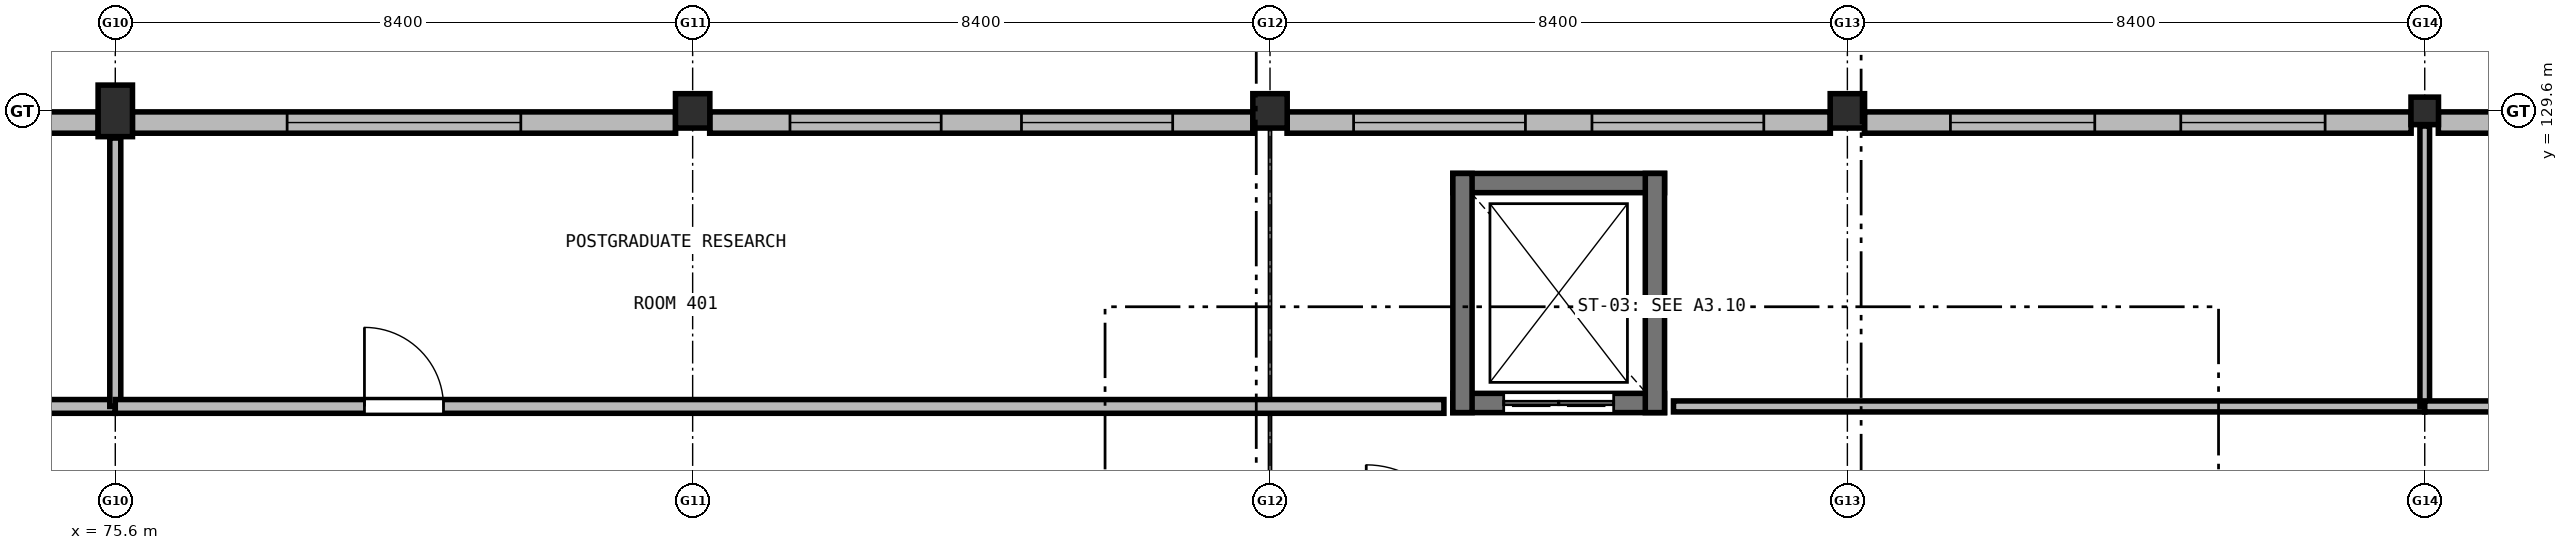
"""IFC4 building model, lengths in metres.
Left out: names, types, materials, properties, quantities, classifications, styles, units other than length and angle.
Written with IfcOpenShell. Run it as: python <this file> out.ifc"""

import sys

from ifc_helpers import new_model, si_unit, direction, frame, frame_2d, origin, origin_2d, place, context, subcontext, project, spatial, rectangle, extrude, element, fill, save


model = new_model("IFC4")
c1 = context("Model", 3, precision=1e-05, world=origin(), true_north=direction((0.0, 1.0)))
c2 = subcontext(c1, "Body", "Model", "MODEL_VIEW")
j1 = project(units=[si_unit("LENGTHUNIT", "METRE"), si_unit("PLANEANGLEUNIT", "RADIAN")], contexts=[c1])
p1 = place(None, origin())
s1 = spatial("IfcSite", under=j1, at=p1, CompositionType="ELEMENT")
p2 = place(p1, origin())
s2 = spatial("IfcBuilding", under=s1, at=p2, CompositionType="ELEMENT")
p3 = place(p2, frame((0.0, 0.0, 17.7)))
s3 = spatial("IfcBuildingStorey", under=s2, at=p3, CompositionType="ELEMENT", Elevation=17.7)
p4 = place(p3, frame((75.6, 129.6, 0.0), z_axis=(0.0, 0.0, 1.0), x_axis=(1.0, 0.0, 0.0)))
e1 = element("IfcColumn", 1, at=p4, inside=s3, PredefinedType="COLUMN", context=c2, shape_type="SweptSolid", body=[
    extrude(rectangle(XDim=0.5, YDim=0.75, at=origin_2d()), origin(), (0.0, 0.0, 1.0), 4.2),
])
for number, where, z_axis, x_axis in (
    (2, (84.0, 129.6, 0.0), (0.0, 0.0, 1.0), (1.0, 0.0, 0.0)),
    (3, (92.4, 129.6, 0.0), (0.0, 0.0, 1.0), (1.0, 0.0, 0.0)),
    (4, (100.8, 129.6, 0.0), (0.0, 0.0, 1.0), (1.0, 0.0, 0.0)),
):
    element("IfcColumn", number, at=place(p3, frame(where, z_axis=z_axis, x_axis=x_axis)), inside=s3, PredefinedType="COLUMN", context=c2, shape_type="SweptSolid", body=[
        extrude(rectangle(XDim=0.5, YDim=0.5, at=origin_2d()), origin(), (0.0, 0.0, 1.0), 4.2),
    ])
p5 = place(p3, frame((109.2, 129.6, 0.0), z_axis=(0.0, 0.0, 1.0), x_axis=(1.0, 0.0, 0.0)))
e5 = element("IfcColumn", 5, at=p5, inside=s3, PredefinedType="COLUMN", context=c2, shape_type="SweptSolid", body=[
    extrude(rectangle(XDim=0.4, YDim=0.4, at=origin_2d()), origin(), (0.0, 0.0, 1.0), 4.2),
])
p6 = place(p3, frame((67.448, 129.43, 0.0), z_axis=(0.0, 0.0, 1.0), x_axis=(1.0, 0.0, 0.0)))
e6 = element("IfcWall", 6, at=p6, inside=s3, PredefinedType="SOLIDWALL", context=c2, shape_type="SweptSolid", body=[
    extrude(rectangle(XDim=7.904, YDim=0.31, at=frame_2d((3.952, 0.0))), origin(), (0.0, 0.0, 1.0), 3.25),
])
p7 = place(p6, frame((2.152, 0.0, 0.95)))
e7 = element("IfcOpeningElement", 7, at=p7, cuts=e6, PredefinedType="OPENING", context=c2, shape_type="SweptSolid", body=[
    extrude(rectangle(XDim=3.6, YDim=2.05, at=frame_2d((1.8, 1.025))), frame((0.0, 0.165, 0.0), z_axis=(0.0, -1.0, 0.0), x_axis=(1.0, 0.0, 0.0)), (0.0, 0.0, 1.0), 0.33),
])
p8 = place(p3, frame((75.848, 129.43, 0.0), z_axis=(0.0, 0.0, 1.0), x_axis=(1.0, 0.0, 0.0)))
e8 = element("IfcWall", 8, at=p8, inside=s3, PredefinedType="SOLIDWALL", context=c2, shape_type="SweptSolid", body=[
    extrude(rectangle(XDim=7.904, YDim=0.31, at=frame_2d((3.952, 0.0))), origin(), (0.0, 0.0, 1.0), 3.25),
])
p9 = place(p8, frame((2.252, 0.0, 0.95)))
e9 = element("IfcOpeningElement", 9, at=p9, cuts=e8, PredefinedType="OPENING", context=c2, shape_type="SweptSolid", body=[
    extrude(rectangle(XDim=3.4, YDim=1.8, at=frame_2d((1.7, 0.9))), frame((0.0, 0.165, 0.0), z_axis=(0.0, -1.0, 0.0), x_axis=(1.0, 0.0, 0.0)), (0.0, 0.0, 1.0), 0.33),
])
p10 = place(p3, frame((84.248, 129.43, 0.0), z_axis=(0.0, 0.0, 1.0), x_axis=(1.0, 0.0, 0.0)))
e10 = element("IfcWall", 10, at=p10, inside=s3, PredefinedType="SOLIDWALL", context=c2, shape_type="SweptSolid", body=[
    extrude(rectangle(XDim=7.904, YDim=0.31, at=frame_2d((3.952, 0.0))), origin(), (0.0, 0.0, 1.0), 3.25),
])
p11 = place(p10, frame((1.168, 0.0, 0.95)))
e11 = element("IfcOpeningElement", 11, at=p11, cuts=e10, PredefinedType="OPENING", context=c2, shape_type="SweptSolid", body=[
    extrude(rectangle(XDim=2.2, YDim=1.7, at=frame_2d((1.1, 0.85))), frame((0.0, 0.165, 0.0), z_axis=(0.0, -1.0, 0.0), x_axis=(1.0, 0.0, 0.0)), (0.0, 0.0, 1.0), 0.33),
])
p12 = place(p10, frame((4.536, 0.0, 0.95)))
e12 = element("IfcOpeningElement", 12, at=p12, cuts=e10, PredefinedType="OPENING", context=c2, shape_type="SweptSolid", body=[
    extrude(rectangle(XDim=2.2, YDim=1.7, at=frame_2d((1.1, 0.85))), frame((0.0, 0.165, 0.0), z_axis=(0.0, -1.0, 0.0), x_axis=(1.0, 0.0, 0.0)), (0.0, 0.0, 1.0), 0.33),
])
p13 = place(p3, frame((92.648, 129.43, 0.0), z_axis=(0.0, 0.0, 1.0), x_axis=(1.0, 0.0, 0.0)))
e13 = element("IfcWall", 13, at=p13, inside=s3, PredefinedType="SOLIDWALL", context=c2, shape_type="SweptSolid", body=[
    extrude(rectangle(XDim=7.904, YDim=0.31, at=frame_2d((3.952, 0.0))), origin(), (0.0, 0.0, 1.0), 3.25),
])
p14 = place(p13, frame((0.968, 0.0, 0.95)))
e14 = element("IfcOpeningElement", 14, at=p14, cuts=e13, PredefinedType="OPENING", context=c2, shape_type="SweptSolid", body=[
    extrude(rectangle(XDim=2.5, YDim=2.05, at=frame_2d((1.25, 1.025))), frame((0.0, 0.165, 0.0), z_axis=(0.0, -1.0, 0.0), x_axis=(1.0, 0.0, 0.0)), (0.0, 0.0, 1.0), 0.33),
])
p15 = place(p13, frame((4.436, 0.0, 0.95)))
e15 = element("IfcOpeningElement", 15, at=p15, cuts=e13, PredefinedType="OPENING", context=c2, shape_type="SweptSolid", body=[
    extrude(rectangle(XDim=2.5, YDim=2.05, at=frame_2d((1.25, 1.025))), frame((0.0, 0.165, 0.0), z_axis=(0.0, -1.0, 0.0), x_axis=(1.0, 0.0, 0.0)), (0.0, 0.0, 1.0), 0.33),
])
p16 = place(p3, frame((101.048, 129.43, 0.0), z_axis=(0.0, 0.0, 1.0), x_axis=(1.0, 0.0, 0.0)))
e16 = element("IfcWall", 16, at=p16, inside=s3, PredefinedType="SOLIDWALL", context=c2, shape_type="SweptSolid", body=[
    extrude(rectangle(XDim=7.954, YDim=0.31, at=frame_2d((3.977, 0.0))), origin(), (0.0, 0.0, 1.0), 3.25),
])
p17 = place(p16, frame((1.251, 0.0, 0.95)))
e17 = element("IfcOpeningElement", 17, at=p17, cuts=e16, PredefinedType="OPENING", context=c2, shape_type="SweptSolid", body=[
    extrude(rectangle(XDim=2.1, YDim=1.85, at=frame_2d((1.05, 0.925))), frame((0.0, 0.165, 0.0), z_axis=(0.0, -1.0, 0.0), x_axis=(1.0, 0.0, 0.0)), (0.0, 0.0, 1.0), 0.33),
])
p18 = place(p16, frame((4.603, 0.0, 0.95)))
e18 = element("IfcOpeningElement", 18, at=p18, cuts=e16, PredefinedType="OPENING", context=c2, shape_type="SweptSolid", body=[
    extrude(rectangle(XDim=2.1, YDim=1.85, at=frame_2d((1.05, 0.925))), frame((0.0, 0.165, 0.0), z_axis=(0.0, -1.0, 0.0), x_axis=(1.0, 0.0, 0.0)), (0.0, 0.0, 1.0), 0.33),
])
p19 = place(p3, frame((109.398, 129.43, 0.0), z_axis=(0.0, 0.0, 1.0), x_axis=(1.0, 0.0, 0.0)))
e19 = element("IfcWall", 19, at=p19, inside=s3, PredefinedType="SOLIDWALL", context=c2, shape_type="SweptSolid", body=[
    extrude(rectangle(XDim=8.004, YDim=0.31, at=frame_2d((4.002, 0.0))), origin(), (0.0, 0.0, 1.0), 3.25),
])
p20 = place(p19, frame((1.535, 0.0, 0.95)))
e20 = element("IfcOpeningElement", 20, at=p20, cuts=e19, PredefinedType="OPENING", context=c2, shape_type="SweptSolid", body=[
    extrude(rectangle(XDim=1.7, YDim=1.65, at=frame_2d((0.85, 0.825))), frame((0.0, 0.165, 0.0), z_axis=(0.0, -1.0, 0.0), x_axis=(1.0, 0.0, 0.0)), (0.0, 0.0, 1.0), 0.33),
])
p21 = place(p19, frame((4.769, 0.0, 0.95)))
e21 = element("IfcOpeningElement", 21, at=p21, cuts=e19, PredefinedType="OPENING", context=c2, shape_type="SweptSolid", body=[
    extrude(rectangle(XDim=1.7, YDim=1.65, at=frame_2d((0.85, 0.825))), frame((0.0, 0.165, 0.0), z_axis=(0.0, -1.0, 0.0), x_axis=(1.0, 0.0, 0.0)), (0.0, 0.0, 1.0), 0.33),
])
p22 = place(p3, frame((98.14, 125.35, 0.0), z_axis=(0.0, 0.0, 1.0), x_axis=(-1.0, 0.0, 0.0)))
e22 = element("IfcWall", 22, at=p22, inside=s3, PredefinedType="SHEAR", context=c2, shape_type="SweptSolid", body=[
    extrude(rectangle(XDim=3.08, YDim=0.28, at=frame_2d((1.54, 0.0))), origin(), (0.0, 0.0, 1.0), 3.88),
])
p23 = place(p22, frame((0.74, 0.0, 0.0)))
e23 = element("IfcOpeningElement", 23, at=p23, cuts=e22, PredefinedType="OPENING", context=c2, shape_type="SweptSolid", body=[
    extrude(rectangle(XDim=1.6, YDim=2.2, at=frame_2d((0.8, 1.1))), frame((0.0, 0.15, 0.0), z_axis=(0.0, -1.0, 0.0), x_axis=(1.0, 0.0, 0.0)), (0.0, 0.0, 1.0), 0.3),
])
p24 = place(p3, frame((95.06, 128.55, 0.0), z_axis=(0.0, 0.0, 1.0), x_axis=(1.0, 0.0, 0.0)))
e24 = element("IfcWall", 24, at=p24, inside=s3, PredefinedType="SHEAR", context=c2, shape_type="SweptSolid", body=[
    extrude(rectangle(XDim=3.08, YDim=0.28, at=frame_2d((1.54, 0.0))), origin(), (0.0, 0.0, 1.0), 3.88),
])
for number, where, z_axis, x_axis in (
    (25, (95.2, 125.21, 0.0), (0.0, 0.0, 1.0), (0.0, 1.0, 0.0)),
    (26, (98.0, 128.69, 0.0), (0.0, 0.0, 1.0), (0.0, -1.0, 0.0)),
):
    element("IfcWall", number, at=place(p3, frame(where, z_axis=z_axis, x_axis=x_axis)), inside=s3, PredefinedType="SHEAR", context=c2, shape_type="SweptSolid", body=[
        extrude(rectangle(XDim=3.48, YDim=0.28, at=frame_2d((1.74, 0.0))), origin(), (0.0, 0.0, 1.0), 3.88),
    ])
p25 = place(p3, frame((56.07, 125.3, 0.0), z_axis=(0.0, 0.0, 1.0), x_axis=(1.0, 0.0, 0.0)))
e27 = element("IfcWall", 27, at=p25, inside=s3, PredefinedType="SOLIDWALL", context=c2, shape_type="SweptSolid", body=[
    extrude(rectangle(XDim=19.53, YDim=0.2, at=frame_2d((9.765, 0.0))), origin(), (0.0, 0.0, 1.0), 3.355),
])
p26 = place(p3, frame((75.6, 125.3, 0.0), z_axis=(0.0, 0.0, 1.0), x_axis=(0.0, 1.0, 0.0)))
e28 = element("IfcWall", 28, at=p26, inside=s3, PredefinedType="PARTITIONING", context=c2, shape_type="SweptSolid", body=[
    extrude(rectangle(XDim=3.905, YDim=0.16, at=frame_2d((1.953, 0.0))), origin(), (0.0, 0.0, 1.0), 3.245),
])
p27 = place(p3, frame((75.6, 125.3, 0.0), z_axis=(0.0, 0.0, 1.0), x_axis=(1.0, 0.0, 0.0)))
e29 = element("IfcWall", 29, at=p27, inside=s3, PredefinedType="SOLIDWALL", context=c2, shape_type="SweptSolid", body=[
    extrude(rectangle(XDim=19.33, YDim=0.2, at=frame_2d((9.665, 0.0))), origin(), (0.0, 0.0, 1.0), 3.355),
])
p28 = place(p27, frame((3.625, 0.0, 0.0)))
e30 = element("IfcOpeningElement", 30, at=p28, cuts=e29, PredefinedType="OPENING", context=c2, shape_type="SweptSolid", body=[
    extrude(rectangle(XDim=1.15, YDim=2.15, at=frame_2d((0.575, 1.075))), frame((0.0, 0.11, 0.0), z_axis=(0.0, -1.0, 0.0), x_axis=(1.0, 0.0, 0.0)), (0.0, 0.0, 1.0), 0.22),
])
p29 = place(p3, frame((98.27, 125.3, 0.0), z_axis=(0.0, 0.0, 1.0), x_axis=(1.0, 0.0, 0.0)))
e31 = element("IfcWall", 31, at=p29, inside=s3, PredefinedType="PARTITIONING", context=c2, shape_type="SweptSolid", body=[
    extrude(rectangle(XDim=10.93, YDim=0.16, at=frame_2d((5.465, 0.0))), origin(), (0.0, 0.0, 1.0), 3.355),
])
p30 = place(p3, frame((109.2, 125.3, 0.0), z_axis=(0.0, 0.0, 1.0), x_axis=(0.0, 1.0, 0.0)))
e32 = element("IfcWall", 32, at=p30, inside=s3, PredefinedType="PARTITIONING", context=c2, shape_type="SweptSolid", body=[
    extrude(rectangle(XDim=4.08, YDim=0.14, at=frame_2d((2.04, 0.0))), origin(), (0.0, 0.0, 1.0), 3.245),
])
p31 = place(p3, frame((109.2, 125.3, 0.0), z_axis=(0.0, 0.0, 1.0), x_axis=(1.0, 0.0, 0.0)))
e33 = element("IfcWall", 33, at=p31, inside=s3, PredefinedType="PARTITIONING", context=c2, shape_type="SweptSolid", body=[
    extrude(rectangle(XDim=24.98, YDim=0.16, at=frame_2d((12.49, 0.0))), origin(), (0.0, 0.0, 1.0), 3.355),
])
p32 = place(p31, frame((3.375, 0.0, 0.0)))
e34 = element("IfcOpeningElement", 34, at=p32, cuts=e33, PredefinedType="OPENING", context=c2, shape_type="SweptSolid", body=[
    extrude(rectangle(XDim=1.65, YDim=2.2, at=frame_2d((0.825, 1.1))), frame((0.0, 0.09, 0.0), z_axis=(0.0, -1.0, 0.0), x_axis=(1.0, 0.0, 0.0)), (0.0, 0.0, 1.0), 0.18),
])
p33 = place(p9, origin())
e35 = element("IfcWindow", 35, at=p33, inside=s3, PartitioningType="SINGLE_PANEL", PredefinedType="WINDOW", context=c2, shape_type="SweptSolid", body=[
    extrude(rectangle(XDim=3.4, YDim=1.8, at=frame_2d((1.7, 0.9))), frame((0.0, 0.03, 0.0), z_axis=(0.0, -1.0, 0.0), x_axis=(1.0, 0.0, 0.0)), (0.0, 0.0, 1.0), 0.06),
])
fill(e9, e35)
p34 = place(p11, origin())
e36 = element("IfcWindow", 36, at=p34, inside=s3, PartitioningType="SINGLE_PANEL", PredefinedType="WINDOW", context=c2, shape_type="SweptSolid", body=[
    extrude(rectangle(XDim=2.2, YDim=1.7, at=frame_2d((1.1, 0.85))), frame((0.0, 0.03, 0.0), z_axis=(0.0, -1.0, 0.0), x_axis=(1.0, 0.0, 0.0)), (0.0, 0.0, 1.0), 0.06),
])
fill(e11, e36)
p35 = place(p12, origin())
e37 = element("IfcWindow", 37, at=p35, inside=s3, PartitioningType="SINGLE_PANEL", PredefinedType="WINDOW", context=c2, shape_type="SweptSolid", body=[
    extrude(rectangle(XDim=2.2, YDim=1.7, at=frame_2d((1.1, 0.85))), frame((0.0, 0.03, 0.0), z_axis=(0.0, -1.0, 0.0), x_axis=(1.0, 0.0, 0.0)), (0.0, 0.0, 1.0), 0.06),
])
fill(e12, e37)
p36 = place(p14, origin())
e38 = element("IfcWindow", 38, at=p36, inside=s3, PartitioningType="SINGLE_PANEL", PredefinedType="WINDOW", context=c2, shape_type="SweptSolid", body=[
    extrude(rectangle(XDim=2.5, YDim=2.05, at=frame_2d((1.25, 1.025))), frame((0.0, 0.03, 0.0), z_axis=(0.0, -1.0, 0.0), x_axis=(1.0, 0.0, 0.0)), (0.0, 0.0, 1.0), 0.06),
])
fill(e14, e38)
p37 = place(p15, origin())
e39 = element("IfcWindow", 39, at=p37, inside=s3, PartitioningType="SINGLE_PANEL", PredefinedType="WINDOW", context=c2, shape_type="SweptSolid", body=[
    extrude(rectangle(XDim=2.5, YDim=2.05, at=frame_2d((1.25, 1.025))), frame((0.0, 0.03, 0.0), z_axis=(0.0, -1.0, 0.0), x_axis=(1.0, 0.0, 0.0)), (0.0, 0.0, 1.0), 0.06),
])
fill(e15, e39)
p38 = place(p17, origin())
e40 = element("IfcWindow", 40, at=p38, inside=s3, PartitioningType="SINGLE_PANEL", PredefinedType="WINDOW", context=c2, shape_type="SweptSolid", body=[
    extrude(rectangle(XDim=2.1, YDim=1.85, at=frame_2d((1.05, 0.925))), frame((0.0, 0.03, 0.0), z_axis=(0.0, -1.0, 0.0), x_axis=(1.0, 0.0, 0.0)), (0.0, 0.0, 1.0), 0.06),
])
fill(e17, e40)
p39 = place(p18, origin())
e41 = element("IfcWindow", 41, at=p39, inside=s3, PartitioningType="SINGLE_PANEL", PredefinedType="WINDOW", context=c2, shape_type="SweptSolid", body=[
    extrude(rectangle(XDim=2.1, YDim=1.85, at=frame_2d((1.05, 0.925))), frame((0.0, 0.03, 0.0), z_axis=(0.0, -1.0, 0.0), x_axis=(1.0, 0.0, 0.0)), (0.0, 0.0, 1.0), 0.06),
])
fill(e18, e41)
p40 = place(p23, origin())
e42 = element("IfcDoor", 42, at=p40, inside=s3, OperationType="DOUBLE_DOOR_SLIDING", PredefinedType="DOOR", context=c2, shape_type="SweptSolid", body=[
    extrude(rectangle(XDim=1.6, YDim=2.2, at=frame_2d((0.8, 1.1))), frame((0.0, 0.025, 0.0), z_axis=(0.0, -1.0, 0.0), x_axis=(1.0, 0.0, 0.0)), (0.0, 0.0, 1.0), 0.05),
])
fill(e23, e42)
p41 = place(p28, origin())
e43 = element("IfcDoor", 43, at=p41, inside=s3, OperationType="SINGLE_SWING_LEFT", PredefinedType="DOOR", context=c2, shape_type="SweptSolid", body=[
    extrude(rectangle(XDim=1.15, YDim=2.15, at=frame_2d((0.575, 1.075))), frame((0.0, 0.025, 0.0), z_axis=(0.0, -1.0, 0.0), x_axis=(1.0, 0.0, 0.0)), (0.0, 0.0, 1.0), 0.05),
])
fill(e30, e43)
save(model, sys.argv[1])
